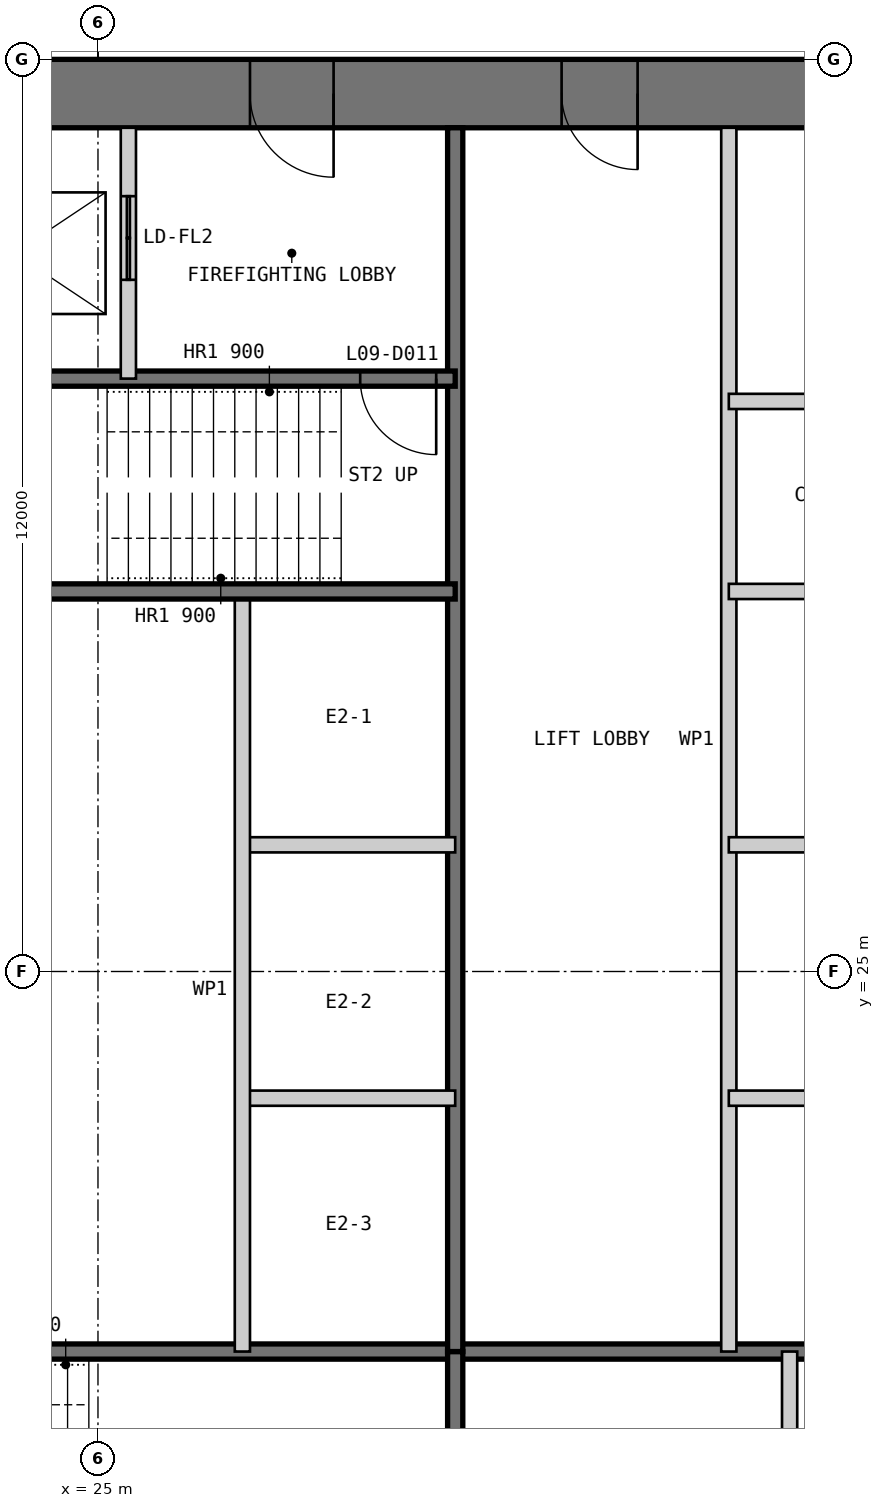
"""IFC4 building model, lengths in metres.
Left out: names, types, materials, properties, quantities, classifications, styles, units other than length and angle.
Written with IfcOpenShell. Run it as: python <this file> out.ifc"""

import sys

from ifc_helpers import new_model, si_unit, direction, frame, frame_2d, origin, place, context, subcontext, project, spatial, polyline, rectangle, outline, extrude, element, fill, save


model = new_model("IFC4")
c1 = context("Model", 3, precision=1e-05, world=origin(), true_north=direction((0.0, 1.0)))
c2 = subcontext(c1, "Body", "Model", "MODEL_VIEW")
j1 = project(units=[si_unit("LENGTHUNIT", "METRE"), si_unit("PLANEANGLEUNIT", "RADIAN")], contexts=[c1])
p1 = place(None, origin())
s1 = spatial("IfcSite", under=j1, at=p1, CompositionType="ELEMENT")
p2 = place(p1, origin())
s2 = spatial("IfcBuilding", under=s1, at=p2, CompositionType="ELEMENT")
p3 = place(p2, frame((0.0, 0.0, 43.0)))
s3 = spatial("IfcBuildingStorey", under=s2, at=p3, CompositionType="ELEMENT", Elevation=43.0)
p4 = place(p3, frame((37.0, 36.55, 0.0), z_axis=(0.0, 0.0, 1.0), x_axis=(-1.0, 0.0, 0.0)))
e1 = element("IfcWall", 1, at=p4, inside=s3, PredefinedType="SHEAR", context=c2, shape_type="SweptSolid", body=[
    extrude(outline(polyline([(0.0, -0.45), (24.0, -0.45), (23.1, 0.45), (0.9, 0.45), (0.0, -0.45)])), origin(), (0.0, 0.0, 1.0), 4.0),
])
p5 = place(p4, frame((4.9, 0.0, 0.0)))
e2 = element("IfcOpeningElement", 2, at=p5, cuts=e1, PredefinedType="OPENING", context=c2, shape_type="SweptSolid", body=[
    extrude(rectangle(XDim=1.0, YDim=2.2, at=frame_2d((0.5, 1.1))), frame((0.0, 0.46, 0.0), z_axis=(0.0, -1.0, 0.0), x_axis=(1.0, 0.0, 0.0)), (0.0, 0.0, 1.0), 0.92),
])
p6 = place(p4, frame((8.9, 0.0, 0.0)))
e3 = element("IfcOpeningElement", 3, at=p6, cuts=e1, PredefinedType="OPENING", context=c2, shape_type="SweptSolid", body=[
    extrude(rectangle(XDim=1.1, YDim=2.2, at=frame_2d((0.55, 1.1))), frame((0.0, 0.46, 0.0), z_axis=(0.0, -1.0, 0.0), x_axis=(1.0, 0.0, 0.0)), (0.0, 0.0, 1.0), 0.92),
])
p7 = place(p4, frame((15.05, 0.0, 0.0)))
e4 = element("IfcOpeningElement", 4, at=p7, cuts=e1, PredefinedType="OPENING", context=c2, shape_type="SweptSolid", body=[
    extrude(rectangle(XDim=0.9, YDim=2.2, at=frame_2d((0.45, 1.1))), frame((0.0, 0.46, 0.0), z_axis=(0.0, -1.0, 0.0), x_axis=(1.0, 0.0, 0.0)), (0.0, 0.0, 1.0), 0.92),
])
p8 = place(p4, frame((17.9, 0.0, 0.0)))
e5 = element("IfcOpeningElement", 5, at=p8, cuts=e1, PredefinedType="OPENING", context=c2, shape_type="SweptSolid", body=[
    extrude(rectangle(XDim=1.0, YDim=2.2, at=frame_2d((0.5, 1.1))), frame((0.0, 0.46, 0.0), z_axis=(0.0, -1.0, 0.0), x_axis=(1.0, 0.0, 0.0)), (0.0, 0.0, 1.0), 0.92),
])
p9 = place(p4, frame((21.4, 0.0, 0.0)))
e6 = element("IfcOpeningElement", 6, at=p9, cuts=e1, PredefinedType="OPENING", context=c2, shape_type="SweptSolid", body=[
    extrude(rectangle(XDim=1.0, YDim=2.2, at=frame_2d((0.5, 1.1))), frame((0.0, 0.46, 0.0), z_axis=(0.0, -1.0, 0.0), x_axis=(1.0, 0.0, 0.0)), (0.0, 0.0, 1.0), 0.92),
])
p10 = place(p3, frame((20.3, 20.0, 0.0), z_axis=(0.0, 0.0, 1.0), x_axis=(1.0, 0.0, 0.0)))
e7 = element("IfcWall", 7, at=p10, inside=s3, PredefinedType="SOLIDWALL", context=c2, shape_type="SweptSolid", body=[
    extrude(rectangle(XDim=15.8, YDim=0.2, at=frame_2d((7.9, 0.0))), origin(), (0.0, 0.0, 1.0), 3.8),
])
p11 = place(p3, frame((29.7, 13.9, 0.0), z_axis=(0.0, 0.0, 1.0), x_axis=(0.0, 1.0, 0.0)))
e8 = element("IfcWall", 8, at=p11, inside=s3, PredefinedType="SOLIDWALL", context=c2, shape_type="SweptSolid", body=[
    extrude(rectangle(XDim=6.1, YDim=0.2, at=frame_2d((3.05, 0.0))), origin(), (0.0, 0.0, 1.0), 3.8),
])
p12 = place(p3, frame((34.1, 13.9, 0.0), z_axis=(0.0, 0.0, 1.0), x_axis=(0.0, 1.0, 0.0)))
e9 = element("IfcWall", 9, at=p12, inside=s3, PredefinedType="PARTITIONING", context=c2, shape_type="SweptSolid", body=[
    extrude(rectangle(XDim=6.1, YDim=0.2, at=frame_2d((3.05, 0.0))), origin(), (0.0, 0.0, 1.0), 3.8),
])
p13 = place(p3, frame((33.3, 36.1, 0.0), z_axis=(0.0, 0.0, 1.0), x_axis=(0.0, -1.0, 0.0)))
e10 = element("IfcWall", 10, at=p13, inside=s3, PredefinedType="PARTITIONING", context=c2, shape_type="SweptSolid", body=[
    extrude(rectangle(XDim=16.1, YDim=0.2, at=frame_2d((8.05, 0.0))), origin(), (0.0, 0.0, 1.0), 3.8),
])
p14 = place(p3, frame((29.7, 36.1, 0.0), z_axis=(0.0, 0.0, 1.0), x_axis=(0.0, -1.0, 0.0)))
e11 = element("IfcWall", 11, at=p14, inside=s3, PredefinedType="SOLIDWALL", context=c2, shape_type="SweptSolid", body=[
    extrude(rectangle(XDim=16.1, YDim=0.2, at=frame_2d((8.05, 0.0))), origin(), (0.0, 0.0, 1.0), 3.8),
])
for number, where, z_axis, x_axis in (
    (12, (36.1, 30.0, 0.0), (0.0, 0.0, 1.0), (-1.0, 0.0, 0.0)),
    (13, (36.1, 26.667, 0.0), (0.0, 0.0, 1.0), (-1.0, 0.0, 0.0)),
    (14, (36.1, 23.333, 0.0), (0.0, 0.0, 1.0), (-1.0, 0.0, 0.0)),
    (15, (29.7, 26.667, 0.0), (0.0, 0.0, 1.0), (-1.0, 0.0, 0.0)),
    (16, (29.7, 23.333, 0.0), (0.0, 0.0, 1.0), (-1.0, 0.0, 0.0)),
):
    element("IfcWall", number, at=place(p3, frame(where, z_axis=z_axis, x_axis=x_axis)), inside=s3, PredefinedType="PARTITIONING", context=c2, shape_type="SweptSolid", body=[
        extrude(rectangle(XDim=2.8, YDim=0.2, at=frame_2d((1.4, 0.0))), origin(), (0.0, 0.0, 1.0), 3.8),
    ])
p15 = place(p3, frame((26.9, 30.0, 0.0), z_axis=(0.0, 0.0, 1.0), x_axis=(0.0, -1.0, 0.0)))
e17 = element("IfcWall", 17, at=p15, inside=s3, PredefinedType="PARTITIONING", context=c2, shape_type="SweptSolid", body=[
    extrude(rectangle(XDim=10.0, YDim=0.2, at=frame_2d((5.0, 0.0))), origin(), (0.0, 0.0, 1.0), 3.8),
])
p16 = place(p3, frame((29.7, 32.8, 0.0), z_axis=(0.0, 0.0, 1.0), x_axis=(-1.0, 0.0, 0.0)))
e18 = element("IfcWall", 18, at=p16, inside=s3, PredefinedType="SOLIDWALL", context=c2, shape_type="SweptSolid", body=[
    extrude(rectangle(XDim=9.4, YDim=0.2, at=frame_2d((4.7, 0.0))), origin(), (0.0, 0.0, 1.0), 3.8),
])
p17 = place(p16, frame((0.25, 0.0, 0.0)))
e19 = element("IfcOpeningElement", 19, at=p17, cuts=e18, PredefinedType="OPENING", context=c2, shape_type="SweptSolid", body=[
    extrude(rectangle(XDim=1.0, YDim=2.2, at=frame_2d((0.5, 1.1))), frame((0.0, 0.11, 0.0), z_axis=(0.0, -1.0, 0.0), x_axis=(1.0, 0.0, 0.0)), (0.0, 0.0, 1.0), 0.22),
])
p18 = place(p3, frame((29.7, 30.0, 0.0), z_axis=(0.0, 0.0, 1.0), x_axis=(-1.0, 0.0, 0.0)))
e20 = element("IfcWall", 20, at=p18, inside=s3, PredefinedType="SOLIDWALL", context=c2, shape_type="SweptSolid", body=[
    extrude(rectangle(XDim=15.8, YDim=0.2, at=frame_2d((7.9, 0.0))), origin(), (0.0, 0.0, 1.0), 3.8),
])
p19 = place(p3, frame((25.4, 36.1, 0.0), z_axis=(0.0, 0.0, 1.0), x_axis=(0.0, -1.0, 0.0)))
e21 = element("IfcWall", 21, at=p19, inside=s3, PredefinedType="PARTITIONING", context=c2, shape_type="SweptSolid", body=[
    extrude(rectangle(XDim=3.3, YDim=0.2, at=frame_2d((1.65, 0.0))), origin(), (0.0, 0.0, 1.0), 3.8),
])
p20 = place(p19, frame((0.9, 0.0, 0.0)))
e22 = element("IfcOpeningElement", 22, at=p20, cuts=e21, PredefinedType="OPENING", context=c2, shape_type="SweptSolid", body=[
    extrude(rectangle(XDim=1.1, YDim=2.2, at=frame_2d((0.55, 1.1))), frame((0.0, 0.11, 0.0), z_axis=(0.0, -1.0, 0.0), x_axis=(1.0, 0.0, 0.0)), (0.0, 0.0, 1.0), 0.22),
])
p21 = place(p3, frame((36.1, 32.5, 0.0), z_axis=(0.0, 0.0, 1.0), x_axis=(-1.0, 0.0, 0.0)))
e23 = element("IfcWall", 23, at=p21, inside=s3, PredefinedType="PARTITIONING", context=c2, shape_type="SweptSolid", body=[
    extrude(rectangle(XDim=2.8, YDim=0.2, at=frame_2d((1.4, 0.0))), origin(), (0.0, 0.0, 1.0), 3.8),
])
p22 = place(p5, origin())
e24 = element("IfcDoor", 24, at=p22, inside=s3, OperationType="SINGLE_SWING_LEFT", PredefinedType="DOOR", context=c2, shape_type="SweptSolid", body=[
    extrude(rectangle(XDim=1.0, YDim=2.2, at=frame_2d((0.5, 1.1))), frame((0.0, 0.025, 0.0), z_axis=(0.0, -1.0, 0.0), x_axis=(1.0, 0.0, 0.0)), (0.0, 0.0, 1.0), 0.05),
    extrude(outline(polyline([(0.0, 0.0), (0.04, 0.0), (0.04, 2.16), (0.96, 2.16), (0.96, 0.0), (1.0, 0.0), (1.0, 2.2), (0.0, 2.2), (0.0, 0.0)])), frame((0.0, 0.3, 0.0), z_axis=(0.0, -1.0, 0.0), x_axis=(1.0, 0.0, 0.0)), (0.0, 0.0, 1.0), 0.6),
])
fill(e2, e24)
p23 = place(p6, origin())
e25 = element("IfcDoor", 25, at=p23, inside=s3, OperationType="SINGLE_SWING_LEFT", PredefinedType="DOOR", context=c2, shape_type="SweptSolid", body=[
    extrude(rectangle(XDim=1.1, YDim=2.2, at=frame_2d((0.55, 1.1))), frame((0.0, 0.025, 0.0), z_axis=(0.0, -1.0, 0.0), x_axis=(1.0, 0.0, 0.0)), (0.0, 0.0, 1.0), 0.05),
    extrude(outline(polyline([(0.0, 0.0), (0.04, 0.0), (0.04, 2.16), (1.06, 2.16), (1.06, 0.0), (1.1, 0.0), (1.1, 2.2), (0.0, 2.2), (0.0, 0.0)])), frame((0.0, 0.3, 0.0), z_axis=(0.0, -1.0, 0.0), x_axis=(1.0, 0.0, 0.0)), (0.0, 0.0, 1.0), 0.6),
])
fill(e3, e25)
p24 = place(p17, origin())
e26 = element("IfcDoor", 26, at=p24, inside=s3, OperationType="SINGLE_SWING_LEFT", PredefinedType="DOOR", context=c2, shape_type="SweptSolid", body=[
    extrude(rectangle(XDim=1.0, YDim=2.2, at=frame_2d((0.5, 1.1))), frame((0.0, 0.025, 0.0), z_axis=(0.0, -1.0, 0.0), x_axis=(1.0, 0.0, 0.0)), (0.0, 0.0, 1.0), 0.05),
])
fill(e19, e26)
p25 = place(p20, origin())
e27 = element("IfcDoor", 27, at=p25, inside=s3, OperationType="DOUBLE_DOOR_SLIDING", PredefinedType="DOOR", context=c2, shape_type="SweptSolid", body=[
    extrude(rectangle(XDim=1.1, YDim=2.2, at=frame_2d((0.55, 1.1))), frame((0.0, 0.025, 0.0), z_axis=(0.0, -1.0, 0.0), x_axis=(1.0, 0.0, 0.0)), (0.0, 0.0, 1.0), 0.05),
])
fill(e22, e27)
save(model, sys.argv[1])
